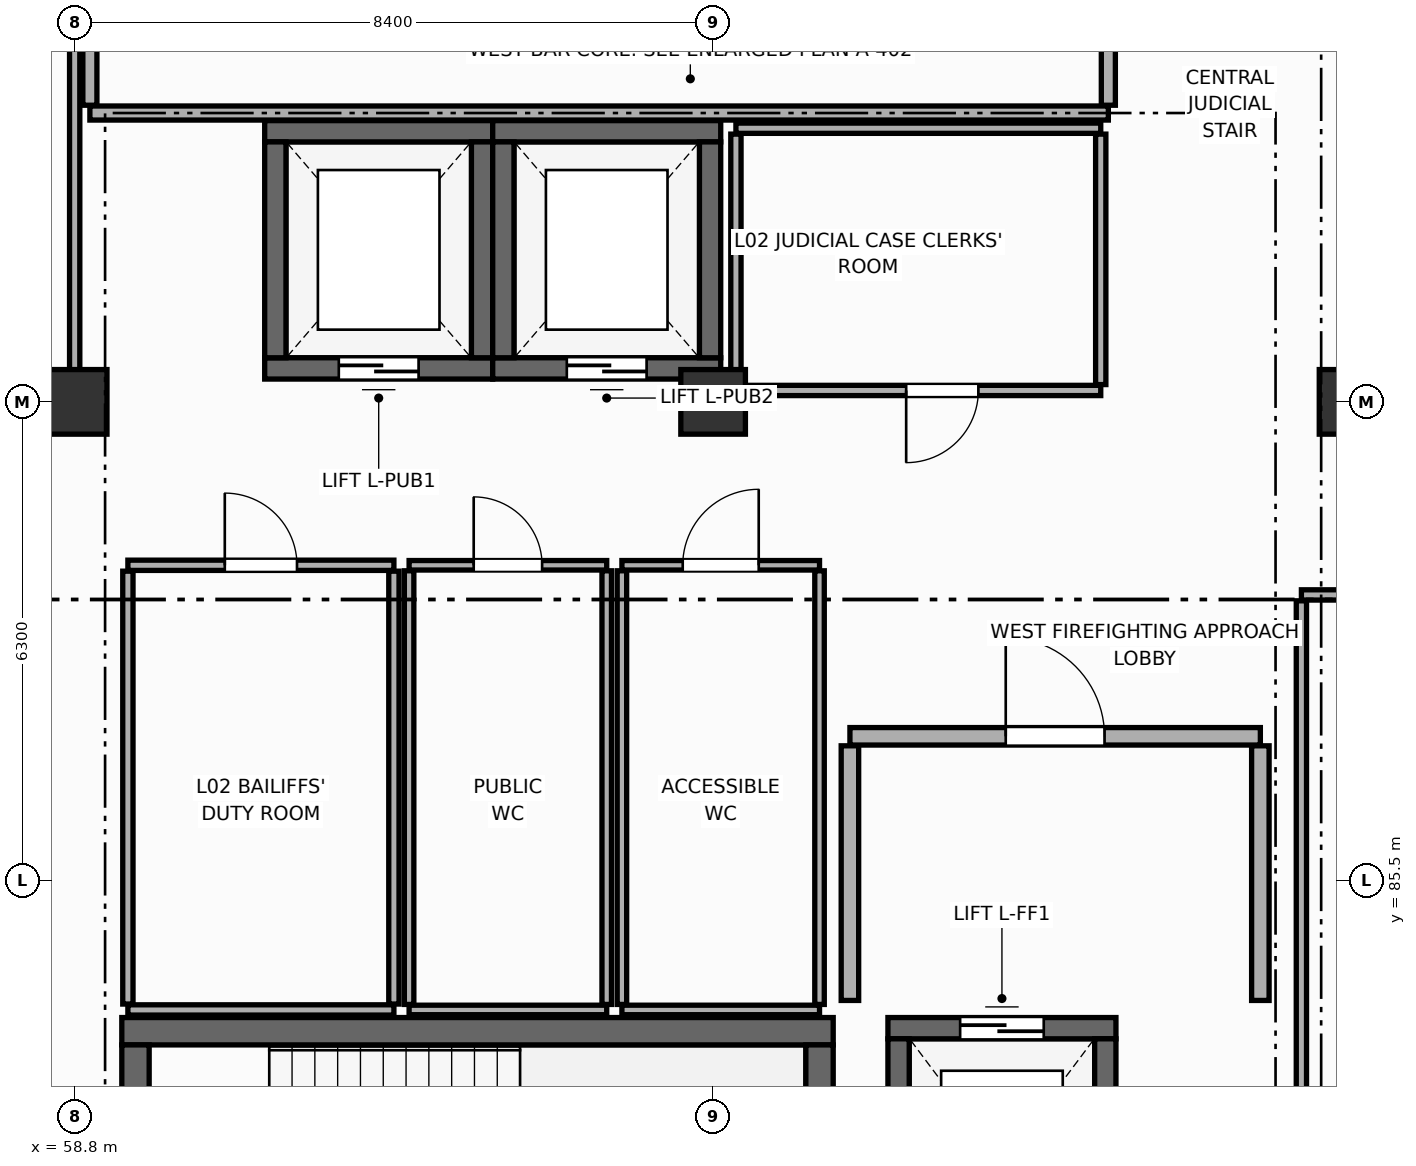
"""IFC4 building model, lengths in metres.
Left out: names, types, materials, properties, quantities, classifications, styles, units other than length and angle.
Written with IfcOpenShell. Run it as: python <this file> out.ifc"""

import sys

from ifc_helpers import new_model, si_unit, direction, frame, frame_2d, origin, origin_2d, place, context, subcontext, project, spatial, rectangle, extrude, element, fill, save


model = new_model("IFC4")
c1 = context("Model", 3, precision=1e-05, world=origin(), true_north=direction((0.0, 1.0)))
c2 = subcontext(c1, "Body", "Model", "MODEL_VIEW")
j1 = project(units=[si_unit("LENGTHUNIT", "METRE"), si_unit("PLANEANGLEUNIT", "RADIAN")], contexts=[c1])
p1 = place(None, origin())
s1 = spatial("IfcSite", under=j1, at=p1, CompositionType="ELEMENT")
p2 = place(p1, origin())
s2 = spatial("IfcBuilding", under=s1, at=p2, CompositionType="ELEMENT")
p3 = place(p2, frame((0.0, 0.0, 5.4)))
s3 = spatial("IfcBuildingStorey", under=s2, at=p3, CompositionType="ELEMENT", Elevation=5.4)
for number, where, z_axis, x_axis in (
    (1, (58.8, 91.8, 0.0), (0.0, 0.0, 1.0), (1.0, 0.0, 0.0)),
    (2, (67.2, 91.8, 0.0), (0.0, 0.0, 1.0), (1.0, 0.0, 0.0)),
    (3, (75.6, 91.8, 0.0), (0.0, 0.0, 1.0), (1.0, 0.0, 0.0)),
):
    element("IfcColumn", number, at=place(p3, frame(where, z_axis=z_axis, x_axis=x_axis)), inside=s3, PredefinedType="COLUMN", context=c2, shape_type="SweptSolid", body=[
        extrude(rectangle(XDim=0.85, YDim=0.85, at=origin_2d()), origin(), (0.0, 0.0, 1.0), 4.5),
    ])
p4 = place(p3, frame((59.42, 83.52, 0.0), z_axis=(0.0, 0.0, 1.0), x_axis=(1.0, 0.0, 0.0)))
e4 = element("IfcWall", 4, at=p4, inside=s3, PredefinedType="SHEAR", context=c2, shape_type="SweptSolid", body=[
    extrude(rectangle(XDim=9.36, YDim=0.36, at=frame_2d((4.68, 0.0))), origin(), (0.0, 0.0, 1.0), 4.24),
])
p5 = place(p3, frame((59.6, 79.98, 0.0), z_axis=(0.0, 0.0, 1.0), x_axis=(0.0, 1.0, 0.0)))
e5 = element("IfcWall", 5, at=p5, inside=s3, PredefinedType="SHEAR", context=c2, shape_type="SweptSolid", body=[
    extrude(rectangle(XDim=3.36, YDim=0.36, at=frame_2d((1.68, 0.0))), origin(), (0.0, 0.0, 1.0), 4.24),
])
p6 = place(p5, frame((1.08, 0.0, 0.0)))
e6 = element("IfcOpeningElement", 6, at=p6, cuts=e5, PredefinedType="OPENING", context=c2, shape_type="SweptSolid", body=[
    extrude(rectangle(XDim=1.2, YDim=2.2, at=frame_2d((0.6, 1.1))), frame((0.0, 0.19, 0.0), z_axis=(0.0, -1.0, 0.0), x_axis=(1.0, 0.0, 0.0)), (0.0, 0.0, 1.0), 0.38),
])
p7 = place(p3, frame((68.6, 83.34, 0.0), z_axis=(0.0, 0.0, 1.0), x_axis=(0.0, -1.0, 0.0)))
e7 = element("IfcWall", 7, at=p7, inside=s3, PredefinedType="SHEAR", context=c2, shape_type="SweptSolid", body=[
    extrude(rectangle(XDim=3.36, YDim=0.36, at=frame_2d((1.68, 0.0))), origin(), (0.0, 0.0, 1.0), 4.24),
])
p8 = place(p3, frame((69.5, 83.56, 0.0), z_axis=(0.0, 0.0, 1.0), x_axis=(1.0, 0.0, 0.0)))
e8 = element("IfcWall", 8, at=p8, inside=s3, PredefinedType="SHEAR", context=c2, shape_type="SweptSolid", body=[
    extrude(rectangle(XDim=3.0, YDim=0.28, at=frame_2d((1.5, 0.0))), origin(), (0.0, 0.0, 1.0), 4.24),
])
p9 = place(p8, frame((0.95, 0.0, 0.0)))
e9 = element("IfcOpeningElement", 9, at=p9, cuts=e8, PredefinedType="OPENING", context=c2, shape_type="SweptSolid", body=[
    extrude(rectangle(XDim=1.1, YDim=2.2, at=frame_2d((0.55, 1.1))), frame((0.0, 0.15, 0.0), z_axis=(0.0, -1.0, 0.0), x_axis=(1.0, 0.0, 0.0)), (0.0, 0.0, 1.0), 0.3),
])
for number, where, z_axis, x_axis in (
    (10, (69.64, 80.18, 0.0), (0.0, 0.0, 1.0), (0.0, 1.0, 0.0)),
    (11, (72.36, 83.42, 0.0), (0.0, 0.0, 1.0), (0.0, -1.0, 0.0)),
):
    element("IfcWall", number, at=place(p3, frame(where, z_axis=z_axis, x_axis=x_axis)), inside=s3, PredefinedType="SHEAR", context=c2, shape_type="SweptSolid", body=[
        extrude(rectangle(XDim=3.24, YDim=0.28, at=frame_2d((1.62, 0.0))), origin(), (0.0, 0.0, 1.0), 4.24),
    ])
p10 = place(p3, frame((61.3, 95.36, 0.0), z_axis=(0.0, 0.0, 1.0), x_axis=(1.0, 0.0, 0.0)))
e12 = element("IfcWall", 12, at=p10, inside=s3, PredefinedType="SHEAR", context=c2, shape_type="SweptSolid", body=[
    extrude(rectangle(XDim=3.0, YDim=0.28, at=frame_2d((1.5, 0.0))), origin(), (0.0, 0.0, 1.0), 4.24),
])
p11 = place(p3, frame((64.3, 92.24, 0.0), z_axis=(0.0, 0.0, 1.0), x_axis=(-1.0, 0.0, 0.0)))
e13 = element("IfcWall", 13, at=p11, inside=s3, PredefinedType="SHEAR", context=c2, shape_type="SweptSolid", body=[
    extrude(rectangle(XDim=3.0, YDim=0.28, at=frame_2d((1.5, 0.0))), origin(), (0.0, 0.0, 1.0), 4.24),
])
p12 = place(p11, frame((0.975, 0.0, 0.0)))
e14 = element("IfcOpeningElement", 14, at=p12, cuts=e13, PredefinedType="OPENING", context=c2, shape_type="SweptSolid", body=[
    extrude(rectangle(XDim=1.05, YDim=2.2, at=frame_2d((0.525, 1.1))), frame((0.0, 0.15, 0.0), z_axis=(0.0, -1.0, 0.0), x_axis=(1.0, 0.0, 0.0)), (0.0, 0.0, 1.0), 0.3),
])
for number, where, z_axis, x_axis in (
    (15, (61.44, 92.38, 0.0), (0.0, 0.0, 1.0), (0.0, 1.0, 0.0)),
    (16, (64.16, 95.22, 0.0), (0.0, 0.0, 1.0), (0.0, -1.0, 0.0)),
):
    element("IfcWall", number, at=place(p3, frame(where, z_axis=z_axis, x_axis=x_axis)), inside=s3, PredefinedType="SHEAR", context=c2, shape_type="SweptSolid", body=[
        extrude(rectangle(XDim=2.84, YDim=0.28, at=frame_2d((1.42, 0.0))), origin(), (0.0, 0.0, 1.0), 4.24),
    ])
p13 = place(p3, frame((64.3, 95.36, 0.0), z_axis=(0.0, 0.0, 1.0), x_axis=(1.0, 0.0, 0.0)))
e17 = element("IfcWall", 17, at=p13, inside=s3, PredefinedType="SHEAR", context=c2, shape_type="SweptSolid", body=[
    extrude(rectangle(XDim=3.0, YDim=0.28, at=frame_2d((1.5, 0.0))), origin(), (0.0, 0.0, 1.0), 4.24),
])
p14 = place(p3, frame((67.3, 92.24, 0.0), z_axis=(0.0, 0.0, 1.0), x_axis=(-1.0, 0.0, 0.0)))
e18 = element("IfcWall", 18, at=p14, inside=s3, PredefinedType="SHEAR", context=c2, shape_type="SweptSolid", body=[
    extrude(rectangle(XDim=3.0, YDim=0.28, at=frame_2d((1.5, 0.0))), origin(), (0.0, 0.0, 1.0), 4.24),
])
p15 = place(p14, frame((0.975, 0.0, 0.0)))
e19 = element("IfcOpeningElement", 19, at=p15, cuts=e18, PredefinedType="OPENING", context=c2, shape_type="SweptSolid", body=[
    extrude(rectangle(XDim=1.05, YDim=2.2, at=frame_2d((0.525, 1.1))), frame((0.0, 0.15, 0.0), z_axis=(0.0, -1.0, 0.0), x_axis=(1.0, 0.0, 0.0)), (0.0, 0.0, 1.0), 0.3),
])
for number, where, z_axis, x_axis in (
    (20, (64.44, 92.38, 0.0), (0.0, 0.0, 1.0), (0.0, 1.0, 0.0)),
    (21, (67.16, 95.22, 0.0), (0.0, 0.0, 1.0), (0.0, -1.0, 0.0)),
):
    element("IfcWall", number, at=place(p3, frame(where, z_axis=z_axis, x_axis=x_axis)), inside=s3, PredefinedType="SHEAR", context=c2, shape_type="SweptSolid", body=[
        extrude(rectangle(XDim=2.84, YDim=0.28, at=frame_2d((1.42, 0.0))), origin(), (0.0, 0.0, 1.0), 4.24),
    ])
p16 = place(p3, frame((69.0, 87.4, 0.0), z_axis=(0.0, 0.0, 1.0), x_axis=(1.0, 0.0, 0.0)))
e22 = element("IfcWall", 22, at=p16, inside=s3, PredefinedType="STANDARD", context=c2, shape_type="SweptSolid", body=[
    extrude(rectangle(XDim=5.4, YDim=0.23, at=frame_2d((2.7, 0.0))), origin(), (0.0, 0.0, 1.0), 4.225),
])
p17 = place(p16, frame((2.05, 0.0, 0.0)))
e23 = element("IfcOpeningElement", 23, at=p17, cuts=e22, PredefinedType="OPENING", context=c2, shape_type="SweptSolid", body=[
    extrude(rectangle(XDim=1.3, YDim=2.2, at=frame_2d((0.65, 1.1))), frame((0.0, 0.125, 0.0), z_axis=(0.0, -1.0, 0.0), x_axis=(1.0, 0.0, 0.0)), (0.0, 0.0, 1.0), 0.25),
])
for number, where, z_axis, x_axis in (
    (24, (69.0, 83.925, 0.0), (0.0, 0.0, 1.0), (0.0, 1.0, 0.0)),
    (25, (74.4, 87.275, 0.0), (0.0, 0.0, 1.0), (0.0, -1.0, 0.0)),
):
    element("IfcWall", number, at=place(p3, frame(where, z_axis=z_axis, x_axis=x_axis)), inside=s3, PredefinedType="STANDARD", context=c2, shape_type="SweptSolid", body=[
        extrude(rectangle(XDim=3.35, YDim=0.23, at=frame_2d((1.675, 0.0))), origin(), (0.0, 0.0, 1.0), 4.225),
    ])
p18 = place(p3, frame((63.2, 89.65, 0.0), z_axis=(0.0, 0.0, 1.0), x_axis=(1.0, 0.0, 0.0)))
e26 = element("IfcWall", 26, at=p18, inside=s3, PredefinedType="PARTITIONING", context=c2, shape_type="SweptSolid", body=[
    extrude(rectangle(XDim=2.6, YDim=0.125, at=frame_2d((1.3, 0.0))), origin(), (0.0, 0.0, 1.0), 4.225),
])
p19 = place(p18, frame((0.85, 0.0, 0.0)))
e27 = element("IfcOpeningElement", 27, at=p19, cuts=e26, PredefinedType="OPENING", context=c2, shape_type="SweptSolid", body=[
    extrude(rectangle(XDim=0.9, YDim=2.1, at=frame_2d((0.45, 1.05))), frame((0.0, 0.073, 0.0), z_axis=(0.0, -1.0, 0.0), x_axis=(1.0, 0.0, 0.0)), (0.0, 0.0, 1.0), 0.145),
])
p20 = place(p3, frame((65.8, 83.8, 0.0), z_axis=(0.0, 0.0, 1.0), x_axis=(-1.0, 0.0, 0.0)))
e28 = element("IfcWall", 28, at=p20, inside=s3, PredefinedType="PARTITIONING", context=c2, shape_type="SweptSolid", body=[
    extrude(rectangle(XDim=2.6, YDim=0.125, at=frame_2d((1.3, 0.0))), origin(), (0.0, 0.0, 1.0), 4.225),
])
for number, where, z_axis, x_axis in (
    (29, (63.2, 83.873, 0.0), (0.0, 0.0, 1.0), (0.0, 1.0, 0.0)),
    (30, (65.8, 89.577, 0.0), (0.0, 0.0, 1.0), (0.0, -1.0, 0.0)),
):
    element("IfcWall", number, at=place(p3, frame(where, z_axis=z_axis, x_axis=x_axis)), inside=s3, PredefinedType="PARTITIONING", context=c2, shape_type="SweptSolid", body=[
        extrude(rectangle(XDim=5.705, YDim=0.125, at=frame_2d((2.853, 0.0))), origin(), (0.0, 0.0, 1.0), 4.225),
    ])
p21 = place(p3, frame((66.0, 89.65, 0.0), z_axis=(0.0, 0.0, 1.0), x_axis=(1.0, 0.0, 0.0)))
e31 = element("IfcWall", 31, at=p21, inside=s3, PredefinedType="PARTITIONING", context=c2, shape_type="SweptSolid", body=[
    extrude(rectangle(XDim=2.6, YDim=0.125, at=frame_2d((1.3, 0.0))), origin(), (0.0, 0.0, 1.0), 3.37),
])
p22 = place(p21, frame((0.8, 0.0, 0.0)))
e32 = element("IfcOpeningElement", 32, at=p22, cuts=e31, PredefinedType="OPENING", context=c2, shape_type="SweptSolid", body=[
    extrude(rectangle(XDim=1.0, YDim=2.1, at=frame_2d((0.5, 1.05))), frame((0.0, 0.073, 0.0), z_axis=(0.0, -1.0, 0.0), x_axis=(1.0, 0.0, 0.0)), (0.0, 0.0, 1.0), 0.145),
])
p23 = place(p3, frame((68.6, 83.8, 0.0), z_axis=(0.0, 0.0, 1.0), x_axis=(-1.0, 0.0, 0.0)))
e33 = element("IfcWall", 33, at=p23, inside=s3, PredefinedType="PARTITIONING", context=c2, shape_type="SweptSolid", body=[
    extrude(rectangle(XDim=2.6, YDim=0.125, at=frame_2d((1.3, 0.0))), origin(), (0.0, 0.0, 1.0), 3.37),
])
for number, where, z_axis, x_axis in (
    (34, (66.0, 83.873, 0.0), (0.0, 0.0, 1.0), (0.0, 1.0, 0.0)),
    (35, (68.6, 89.577, 0.0), (0.0, 0.0, 1.0), (0.0, -1.0, 0.0)),
):
    element("IfcWall", number, at=place(p3, frame(where, z_axis=z_axis, x_axis=x_axis)), inside=s3, PredefinedType="PARTITIONING", context=c2, shape_type="SweptSolid", body=[
        extrude(rectangle(XDim=5.705, YDim=0.125, at=frame_2d((2.853, 0.0))), origin(), (0.0, 0.0, 1.0), 4.225),
    ])
p24 = place(p3, frame((59.5, 89.65, 0.0), z_axis=(0.0, 0.0, 1.0), x_axis=(1.0, 0.0, 0.0)))
e36 = element("IfcWall", 36, at=p24, inside=s3, PredefinedType="PARTITIONING", context=c2, shape_type="SweptSolid", body=[
    extrude(rectangle(XDim=3.5, YDim=0.135, at=frame_2d((1.75, 0.0))), origin(), (0.0, 0.0, 1.0), 4.225),
])
p25 = place(p24, frame((1.275, 0.0, 0.0)))
e37 = element("IfcOpeningElement", 37, at=p25, cuts=e36, PredefinedType="OPENING", context=c2, shape_type="SweptSolid", body=[
    extrude(rectangle(XDim=0.95, YDim=2.15, at=frame_2d((0.475, 1.075))), frame((0.0, 0.077, 0.0), z_axis=(0.0, -1.0, 0.0), x_axis=(1.0, 0.0, 0.0)), (0.0, 0.0, 1.0), 0.155),
])
p26 = place(p3, frame((63.0, 83.8, 0.0), z_axis=(0.0, 0.0, 1.0), x_axis=(-1.0, 0.0, 0.0)))
e38 = element("IfcWall", 38, at=p26, inside=s3, PredefinedType="PARTITIONING", context=c2, shape_type="SweptSolid", body=[
    extrude(rectangle(XDim=3.5, YDim=0.135, at=frame_2d((1.75, 0.0))), origin(), (0.0, 0.0, 1.0), 4.225),
])
for number, where, z_axis, x_axis in (
    (39, (59.5, 83.877, 0.0), (0.0, 0.0, 1.0), (0.0, 1.0, 0.0)),
    (40, (63.0, 89.573, 0.0), (0.0, 0.0, 1.0), (0.0, -1.0, 0.0)),
):
    element("IfcWall", number, at=place(p3, frame(where, z_axis=z_axis, x_axis=x_axis)), inside=s3, PredefinedType="PARTITIONING", context=c2, shape_type="SweptSolid", body=[
        extrude(rectangle(XDim=5.695, YDim=0.135, at=frame_2d((2.848, 0.0))), origin(), (0.0, 0.0, 1.0), 4.225),
    ])
p27 = place(p3, frame((72.4, 95.6, 0.0), z_axis=(0.0, 0.0, 1.0), x_axis=(-1.0, 0.0, 0.0)))
e41 = element("IfcWall", 41, at=p27, inside=s3, PredefinedType="PARTITIONING", context=c2, shape_type="SweptSolid", body=[
    extrude(rectangle(XDim=13.4, YDim=0.185, at=frame_2d((6.7, 0.0))), origin(), (0.0, 0.0, 1.0), 3.37),
])
p28 = place(p3, frame((59.0, 95.702, 0.0), z_axis=(0.0, 0.0, 1.0), x_axis=(0.0, 1.0, 0.0)))
e42 = element("IfcWall", 42, at=p28, inside=s3, PredefinedType="PARTITIONING", context=c2, shape_type="SweptSolid", body=[
    extrude(rectangle(XDim=7.795, YDim=0.185, at=frame_2d((3.897, 0.0))), origin(), (0.0, 0.0, 1.0), 3.37),
])
p29 = place(p3, frame((72.4, 103.498, 0.0), z_axis=(0.0, 0.0, 1.0), x_axis=(0.0, -1.0, 0.0)))
e43 = element("IfcWall", 43, at=p29, inside=s3, PredefinedType="PARTITIONING", context=c2, shape_type="SweptSolid", body=[
    extrude(rectangle(XDim=7.795, YDim=0.185, at=frame_2d((3.897, 0.0))), origin(), (0.0, 0.0, 1.0), 3.62),
])
p30 = place(p29, frame((2.133, 0.0, 0.0)))
e44 = element("IfcOpeningElement", 44, at=p30, cuts=e43, PredefinedType="OPENING", context=c2, shape_type="SweptSolid", body=[
    extrude(rectangle(XDim=2.0, YDim=2.5, at=frame_2d((1.0, 1.25))), frame((0.0, 0.103, 0.0), z_axis=(0.0, -1.0, 0.0), x_axis=(1.0, 0.0, 0.0)), (0.0, 0.0, 1.0), 0.205),
])
p31 = place(p3, frame((67.5, 95.4, 0.0), z_axis=(0.0, 0.0, 1.0), x_axis=(1.0, 0.0, 0.0)))
e45 = element("IfcWall", 45, at=p31, inside=s3, PredefinedType="PARTITIONING", context=c2, shape_type="SweptSolid", body=[
    extrude(rectangle(XDim=4.8, YDim=0.135, at=frame_2d((2.4, 0.0))), origin(), (0.0, 0.0, 1.0), 3.37),
])
p32 = place(p3, frame((72.3, 91.95, 0.0), z_axis=(0.0, 0.0, 1.0), x_axis=(-1.0, 0.0, 0.0)))
e46 = element("IfcWall", 46, at=p32, inside=s3, PredefinedType="PARTITIONING", context=c2, shape_type="SweptSolid", body=[
    extrude(rectangle(XDim=4.8, YDim=0.135, at=frame_2d((2.4, 0.0))), origin(), (0.0, 0.0, 1.0), 3.37),
])
p33 = place(p32, frame((1.61, 0.0, 0.0)))
e47 = element("IfcOpeningElement", 47, at=p33, cuts=e46, PredefinedType="OPENING", context=c2, shape_type="SweptSolid", body=[
    extrude(rectangle(XDim=0.95, YDim=2.15, at=frame_2d((0.475, 1.075))), frame((0.0, 0.077, 0.0), z_axis=(0.0, -1.0, 0.0), x_axis=(1.0, 0.0, 0.0)), (0.0, 0.0, 1.0), 0.155),
])
p34 = place(p3, frame((67.5, 92.028, 0.0), z_axis=(0.0, 0.0, 1.0), x_axis=(0.0, 1.0, 0.0)))
e48 = element("IfcWall", 48, at=p34, inside=s3, PredefinedType="PARTITIONING", context=c2, shape_type="SweptSolid", body=[
    extrude(rectangle(XDim=3.295, YDim=0.135, at=frame_2d((1.647, 0.0))), origin(), (0.0, 0.0, 1.0), 3.37),
])
p35 = place(p3, frame((72.3, 95.323, 0.0), z_axis=(0.0, 0.0, 1.0), x_axis=(0.0, -1.0, 0.0)))
e49 = element("IfcWall", 49, at=p35, inside=s3, PredefinedType="PARTITIONING", context=c2, shape_type="SweptSolid", body=[
    extrude(rectangle(XDim=3.295, YDim=0.135, at=frame_2d((1.647, 0.0))), origin(), (0.0, 0.0, 1.0), 3.57),
])
p36 = place(p3, frame((74.94, 89.26, 0.0), z_axis=(0.0, 0.0, 1.0), x_axis=(1.0, 0.0, 0.0)))
e50 = element("IfcWall", 50, at=p36, inside=s3, PredefinedType="PARTITIONING", context=c2, shape_type="SweptSolid", body=[
    extrude(rectangle(XDim=4.958, YDim=0.135, at=frame_2d((2.479, 0.0))), origin(), (0.0, 0.0, 1.0), 3.37),
])
p37 = place(p36, frame((2.131, 0.0, 0.0)))
e51 = element("IfcOpeningElement", 51, at=p37, cuts=e50, PredefinedType="OPENING", context=c2, shape_type="SweptSolid", body=[
    extrude(rectangle(XDim=1.02, YDim=2.15, at=frame_2d((0.51, 1.075))), frame((0.0, 0.077, 0.0), z_axis=(0.0, -1.0, 0.0), x_axis=(1.0, 0.0, 0.0)), (0.0, 0.0, 1.0), 0.155),
])
p38 = place(p3, frame((74.94, 79.817, 0.0), z_axis=(0.0, 0.0, 1.0), x_axis=(0.0, 1.0, 0.0)))
e52 = element("IfcWall", 52, at=p38, inside=s3, PredefinedType="PARTITIONING", context=c2, shape_type="SweptSolid", body=[
    extrude(rectangle(XDim=9.365, YDim=0.135, at=frame_2d((4.683, 0.0))), origin(), (0.0, 0.0, 1.0), 4.225),
])
p39 = place(p3, frame((58.8, 91.95, 0.0), z_axis=(0.0, 0.0, 1.0), x_axis=(-1.0, 0.0, 0.0)))
e53 = element("IfcWall", 53, at=p39, inside=s3, PredefinedType="PARTITIONING", context=c2, shape_type="SweptSolid", body=[
    extrude(rectangle(XDim=9.5, YDim=0.135, at=frame_2d((4.75, 0.0))), origin(), (0.0, 0.0, 1.0), 3.27),
])
p40 = place(p39, frame((3.073, 0.0, 0.0)))
e54 = element("IfcOpeningElement", 54, at=p40, cuts=e53, PredefinedType="OPENING", context=c2, shape_type="SweptSolid", body=[
    extrude(rectangle(XDim=1.02, YDim=2.15, at=frame_2d((0.51, 1.075))), frame((0.0, 0.077, 0.0), z_axis=(0.0, -1.0, 0.0), x_axis=(1.0, 0.0, 0.0)), (0.0, 0.0, 1.0), 0.155),
])
p41 = place(p3, frame((58.8, 99.423, 0.0), z_axis=(0.0, 0.0, 1.0), x_axis=(0.0, -1.0, 0.0)))
e55 = element("IfcWall", 55, at=p41, inside=s3, PredefinedType="PARTITIONING", context=c2, shape_type="SweptSolid", body=[
    extrude(rectangle(XDim=7.395, YDim=0.135, at=frame_2d((3.698, 0.0))), origin(), (0.0, 0.0, 1.0), 3.37),
])
p42 = place(p9, origin())
e56 = element("IfcDoor", 56, at=p42, inside=s3, OperationType="DOUBLE_DOOR_SLIDING", PredefinedType="DOOR", context=c2, shape_type="SweptSolid", body=[
    extrude(rectangle(XDim=1.1, YDim=2.2, at=frame_2d((0.55, 1.1))), frame((0.0, 0.025, 0.0), z_axis=(0.0, -1.0, 0.0), x_axis=(1.0, 0.0, 0.0)), (0.0, 0.0, 1.0), 0.05),
])
fill(e9, e56)
p43 = place(p12, origin())
e57 = element("IfcDoor", 57, at=p43, inside=s3, OperationType="DOUBLE_DOOR_SLIDING", PredefinedType="DOOR", context=c2, shape_type="SweptSolid", body=[
    extrude(rectangle(XDim=1.05, YDim=2.2, at=frame_2d((0.525, 1.1))), frame((0.0, 0.025, 0.0), z_axis=(0.0, -1.0, 0.0), x_axis=(1.0, 0.0, 0.0)), (0.0, 0.0, 1.0), 0.05),
])
fill(e14, e57)
p44 = place(p15, origin())
e58 = element("IfcDoor", 58, at=p44, inside=s3, OperationType="DOUBLE_DOOR_SLIDING", PredefinedType="DOOR", context=c2, shape_type="SweptSolid", body=[
    extrude(rectangle(XDim=1.05, YDim=2.2, at=frame_2d((0.525, 1.1))), frame((0.0, 0.025, 0.0), z_axis=(0.0, -1.0, 0.0), x_axis=(1.0, 0.0, 0.0)), (0.0, 0.0, 1.0), 0.05),
])
fill(e19, e58)
p45 = place(p17, origin())
e59 = element("IfcDoor", 59, at=p45, inside=s3, OperationType="SINGLE_SWING_LEFT", PredefinedType="DOOR", context=c2, shape_type="SweptSolid", body=[
    extrude(rectangle(XDim=1.3, YDim=2.2, at=frame_2d((0.65, 1.1))), frame((0.0, 0.025, 0.0), z_axis=(0.0, -1.0, 0.0), x_axis=(1.0, 0.0, 0.0)), (0.0, 0.0, 1.0), 0.05),
])
fill(e23, e59)
p46 = place(p19, origin())
e60 = element("IfcDoor", 60, at=p46, inside=s3, OperationType="SINGLE_SWING_LEFT", PredefinedType="DOOR", context=c2, shape_type="SweptSolid", body=[
    extrude(rectangle(XDim=0.9, YDim=2.1, at=frame_2d((0.45, 1.05))), frame((0.0, 0.025, 0.0), z_axis=(0.0, -1.0, 0.0), x_axis=(1.0, 0.0, 0.0)), (0.0, 0.0, 1.0), 0.05),
])
fill(e27, e60)
p47 = place(p22, origin())
e61 = element("IfcDoor", 61, at=p47, inside=s3, OperationType="SINGLE_SWING_RIGHT", PredefinedType="DOOR", context=c2, shape_type="SweptSolid", body=[
    extrude(rectangle(XDim=1.0, YDim=2.1, at=frame_2d((0.5, 1.05))), frame((0.0, 0.025, 0.0), z_axis=(0.0, -1.0, 0.0), x_axis=(1.0, 0.0, 0.0)), (0.0, 0.0, 1.0), 0.05),
])
fill(e32, e61)
p48 = place(p25, origin())
e62 = element("IfcDoor", 62, at=p48, inside=s3, OperationType="SINGLE_SWING_LEFT", PredefinedType="DOOR", context=c2, shape_type="SweptSolid", body=[
    extrude(rectangle(XDim=0.95, YDim=2.15, at=frame_2d((0.475, 1.075))), frame((0.0, 0.025, 0.0), z_axis=(0.0, -1.0, 0.0), x_axis=(1.0, 0.0, 0.0)), (0.0, 0.0, 1.0), 0.05),
])
fill(e37, e62)
p49 = place(p33, origin())
e63 = element("IfcDoor", 63, at=p49, inside=s3, OperationType="SINGLE_SWING_RIGHT", PredefinedType="DOOR", context=c2, shape_type="SweptSolid", body=[
    extrude(rectangle(XDim=0.95, YDim=2.15, at=frame_2d((0.475, 1.075))), frame((0.0, 0.025, 0.0), z_axis=(0.0, -1.0, 0.0), x_axis=(1.0, 0.0, 0.0)), (0.0, 0.0, 1.0), 0.05),
])
fill(e47, e63)
save(model, sys.argv[1])
